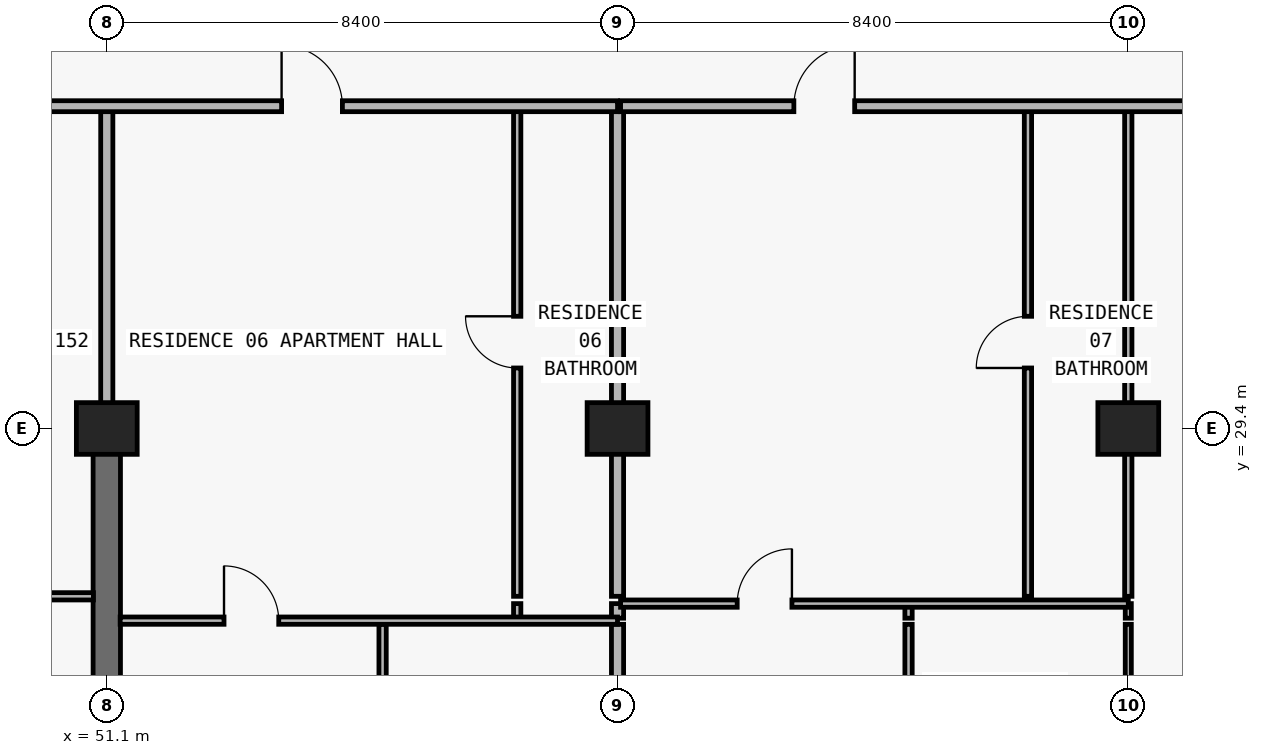
"""IFC4 building model, lengths in metres.
Left out: names, types, materials, properties, quantities, classifications, styles, units other than length and angle.
Written with IfcOpenShell. Run it as: python <this file> out.ifc"""

import sys

from ifc_helpers import new_model, si_unit, direction, frame, frame_2d, origin, origin_2d, place, context, subcontext, project, spatial, rectangle, extrude, element, fill, save


model = new_model("IFC4")
c1 = context("Model", 3, precision=1e-05, world=origin(), true_north=direction((0.0, 1.0)))
c2 = subcontext(c1, "Body", "Model", "MODEL_VIEW")
j1 = project(units=[si_unit("LENGTHUNIT", "METRE"), si_unit("PLANEANGLEUNIT", "RADIAN")], contexts=[c1])
p1 = place(None, origin())
s1 = spatial("IfcSite", under=j1, at=p1, CompositionType="ELEMENT")
p2 = place(p1, origin())
s2 = spatial("IfcBuilding", under=s1, at=p2, CompositionType="ELEMENT")
p3 = place(p2, frame((0.0, 0.0, 125.7)))
s3 = spatial("IfcBuildingStorey", under=s2, at=p3, CompositionType="ELEMENT", Elevation=125.7)
for number, where, z_axis, x_axis in (
    (1, (51.1, 29.4, 0.0), (0.0, 0.0, 1.0), (1.0, 0.0, 0.0)),
    (2, (59.5, 29.4, 0.0), (0.0, 0.0, 1.0), (1.0, 0.0, 0.0)),
    (3, (67.9, 29.4, 0.0), (0.0, 0.0, 1.0), (1.0, 0.0, 0.0)),
):
    element("IfcColumn", number, at=place(p3, frame(where, z_axis=z_axis, x_axis=x_axis)), inside=s3, PredefinedType="COLUMN", context=c2, shape_type="SweptSolid", body=[
        extrude(rectangle(XDim=1.0, YDim=0.85, at=origin_2d()), origin(), (0.0, 0.0, 1.0), 3.05),
    ])
p4 = place(p3, frame((51.1, 20.8, 0.0), z_axis=(0.0, 0.0, 1.0), x_axis=(0.0, 1.0, 0.0)))
e4 = element("IfcWall", 4, at=p4, inside=s3, PredefinedType="SHEAR", context=c2, shape_type="SweptSolid", body=[
    extrude(rectangle(XDim=8.6, YDim=0.45, at=frame_2d((4.3, 0.0))), origin(), (0.0, 0.0, 1.0), 3.05),
])
p5 = place(p3, frame((51.1, 29.405, 0.0), z_axis=(0.0, 0.0, 1.0), x_axis=(0.0, 1.0, 0.0)))
e5 = element("IfcWall", 5, at=p5, inside=s3, PredefinedType="PARTITIONING", context=c2, shape_type="SweptSolid", body=[
    extrude(rectangle(XDim=5.295, YDim=0.2, at=frame_2d((2.647, 0.0))), origin(), (0.0, 0.0, 1.0), 2.335),
])
p6 = place(p3, frame((55.636, 21.49, 0.0), z_axis=(0.0, 0.0, 1.0), x_axis=(0.0, 1.0, 0.0)))
e6 = element("IfcWall", 6, at=p6, inside=s3, PredefinedType="PARTITIONING", context=c2, shape_type="SweptSolid", body=[
    extrude(rectangle(XDim=4.69, YDim=0.12, at=frame_2d((2.345, 0.0))), origin(), (0.0, 0.0, 1.0), 3.05),
])
p7 = place(p6, frame((1.895, 0.0, 0.0)))
e7 = element("IfcOpeningElement", 7, at=p7, cuts=e6, PredefinedType="OPENING", context=c2, shape_type="SweptSolid", body=[
    extrude(rectangle(XDim=0.9, YDim=2.15, at=frame_2d((0.45, 1.075))), frame((0.0, 0.07, 0.0), z_axis=(0.0, -1.0, 0.0), x_axis=(1.0, 0.0, 0.0)), (0.0, 0.0, 1.0), 0.14),
])
p8 = place(p3, frame((57.85, 26.28, 0.0), z_axis=(0.0, 0.0, 1.0), x_axis=(0.0, 1.0, 0.0)))
e8 = element("IfcWall", 8, at=p8, inside=s3, PredefinedType="PARTITIONING", context=c2, shape_type="SweptSolid", body=[
    extrude(rectangle(XDim=0.24, YDim=0.12, at=frame_2d((0.12, 0.0))), origin(), (0.0, 0.0, 1.0), 3.05),
])
p9 = place(p3, frame((57.85, 26.64, 0.0), z_axis=(0.0, 0.0, 1.0), x_axis=(0.0, 1.0, 0.0)))
e9 = element("IfcWall", 9, at=p9, inside=s3, PredefinedType="PARTITIONING", context=c2, shape_type="SweptSolid", body=[
    extrude(rectangle(XDim=8.06, YDim=0.12, at=frame_2d((4.03, 0.0))), origin(), (0.0, 0.0, 1.0), 3.05),
])
p10 = place(p9, frame((3.755, 0.0, 0.0)))
e10 = element("IfcOpeningElement", 10, at=p10, cuts=e9, PredefinedType="OPENING", context=c2, shape_type="SweptSolid", body=[
    extrude(rectangle(XDim=0.85, YDim=2.1, at=frame_2d((0.425, 1.05))), frame((0.0, 0.07, 0.0), z_axis=(0.0, -1.0, 0.0), x_axis=(1.0, 0.0, 0.0)), (0.0, 0.0, 1.0), 0.14),
])
p11 = place(p3, frame((59.5, 21.49, 0.0), z_axis=(0.0, 0.0, 1.0), x_axis=(0.0, 1.0, 0.0)))
e11 = element("IfcWall", 11, at=p11, inside=s3, PredefinedType="PARTITIONING", context=c2, shape_type="SweptSolid", body=[
    extrude(rectangle(XDim=4.69, YDim=0.2, at=frame_2d((2.345, 0.0))), origin(), (0.0, 0.0, 1.0), 2.174),
])
p12 = place(p3, frame((59.5, 26.28, 0.0), z_axis=(0.0, 0.0, 1.0), x_axis=(0.0, 1.0, 0.0)))
e12 = element("IfcWall", 12, at=p12, inside=s3, PredefinedType="PARTITIONING", context=c2, shape_type="SweptSolid", body=[
    extrude(rectangle(XDim=0.24, YDim=0.2, at=frame_2d((0.12, 0.0))), origin(), (0.0, 0.0, 1.0), 2.174),
])
p13 = place(p3, frame((59.5, 26.64, 0.0), z_axis=(0.0, 0.0, 1.0), x_axis=(0.0, 1.0, 0.0)))
e13 = element("IfcWall", 13, at=p13, inside=s3, PredefinedType="PARTITIONING", context=c2, shape_type="SweptSolid", body=[
    extrude(rectangle(XDim=8.06, YDim=0.2, at=frame_2d((4.03, 0.0))), origin(), (0.0, 0.0, 1.0), 2.174),
])
p14 = place(p3, frame((64.286, 21.49, 0.0), z_axis=(0.0, 0.0, 1.0), x_axis=(0.0, 1.0, 0.0)))
e14 = element("IfcWall", 14, at=p14, inside=s3, PredefinedType="PARTITIONING", context=c2, shape_type="SweptSolid", body=[
    extrude(rectangle(XDim=4.69, YDim=0.12, at=frame_2d((2.345, 0.0))), origin(), (0.0, 0.0, 1.0), 3.05),
])
p15 = place(p14, frame((1.895, 0.0, 0.0)))
e15 = element("IfcOpeningElement", 15, at=p15, cuts=e14, PredefinedType="OPENING", context=c2, shape_type="SweptSolid", body=[
    extrude(rectangle(XDim=0.9, YDim=2.15, at=frame_2d((0.45, 1.075))), frame((0.0, 0.07, 0.0), z_axis=(0.0, -1.0, 0.0), x_axis=(1.0, 0.0, 0.0)), (0.0, 0.0, 1.0), 0.14),
])
p16 = place(p3, frame((64.286, 26.28, 0.0), z_axis=(0.0, 0.0, 1.0), x_axis=(0.0, 1.0, 0.0)))
e16 = element("IfcWall", 16, at=p16, inside=s3, PredefinedType="PARTITIONING", context=c2, shape_type="SweptSolid", body=[
    extrude(rectangle(XDim=0.24, YDim=0.12, at=frame_2d((0.12, 0.0))), origin(), (0.0, 0.0, 1.0), 3.05),
])
p17 = place(p3, frame((66.25, 26.64, 0.0), z_axis=(0.0, 0.0, 1.0), x_axis=(0.0, 1.0, 0.0)))
e17 = element("IfcWall", 17, at=p17, inside=s3, PredefinedType="PARTITIONING", context=c2, shape_type="SweptSolid", body=[
    extrude(rectangle(XDim=8.06, YDim=0.12, at=frame_2d((4.03, 0.0))), origin(), (0.0, 0.0, 1.0), 3.05),
])
p18 = place(p17, frame((3.755, 0.0, 0.0)))
e18 = element("IfcOpeningElement", 18, at=p18, cuts=e17, PredefinedType="OPENING", context=c2, shape_type="SweptSolid", body=[
    extrude(rectangle(XDim=0.85, YDim=2.1, at=frame_2d((0.425, 1.05))), frame((0.0, 0.07, 0.0), z_axis=(0.0, -1.0, 0.0), x_axis=(1.0, 0.0, 0.0)), (0.0, 0.0, 1.0), 0.14),
])
p19 = place(p3, frame((67.9, 21.49, 0.0), z_axis=(0.0, 0.0, 1.0), x_axis=(0.0, 1.0, 0.0)))
e19 = element("IfcWall", 19, at=p19, inside=s3, PredefinedType="MOVABLE", context=c2, shape_type="SweptSolid", body=[
    extrude(rectangle(XDim=4.69, YDim=0.1, at=frame_2d((2.345, 0.0))), origin(), (0.0, 0.0, 1.0), 2.174),
])
p20 = place(p19, frame((1.895, 0.0, 0.0)))
e20 = element("IfcOpeningElement", 20, at=p20, cuts=e19, PredefinedType="OPENING", context=c2, shape_type="SweptSolid", body=[
    extrude(rectangle(XDim=0.9, YDim=2.124, at=frame_2d((0.45, 1.062))), frame((0.0, 0.06, 0.0), z_axis=(0.0, -1.0, 0.0), x_axis=(1.0, 0.0, 0.0)), (0.0, 0.0, 1.0), 0.12),
])
p21 = place(p3, frame((67.9, 26.28, 0.0), z_axis=(0.0, 0.0, 1.0), x_axis=(0.0, 1.0, 0.0)))
e21 = element("IfcWall", 21, at=p21, inside=s3, PredefinedType="MOVABLE", context=c2, shape_type="SweptSolid", body=[
    extrude(rectangle(XDim=0.24, YDim=0.1, at=frame_2d((0.12, 0.0))), origin(), (0.0, 0.0, 1.0), 2.174),
])
p22 = place(p3, frame((67.9, 26.64, 0.0), z_axis=(0.0, 0.0, 1.0), x_axis=(0.0, 1.0, 0.0)))
e22 = element("IfcWall", 22, at=p22, inside=s3, PredefinedType="PARTITIONING", context=c2, shape_type="SweptSolid", body=[
    extrude(rectangle(XDim=8.06, YDim=0.12, at=frame_2d((4.03, 0.0))), origin(), (0.0, 0.0, 1.0), 2.174),
])
p23 = place(p3, frame((51.32, 26.24, 0.0), z_axis=(0.0, 0.0, 1.0), x_axis=(1.0, 0.0, 0.0)))
e23 = element("IfcWall", 23, at=p23, inside=s3, PredefinedType="PARTITIONING", context=c2, shape_type="SweptSolid", body=[
    extrude(rectangle(XDim=8.18, YDim=0.12, at=frame_2d((4.09, 0.0))), origin(), (0.0, 0.0, 1.0), 3.05),
])
p24 = place(p23, frame((1.708, 0.0, 0.0)))
e24 = element("IfcOpeningElement", 24, at=p24, cuts=e23, PredefinedType="OPENING", context=c2, shape_type="SweptSolid", body=[
    extrude(rectangle(XDim=0.9, YDim=2.15, at=frame_2d((0.45, 1.075))), frame((0.0, 0.07, 0.0), z_axis=(0.0, -1.0, 0.0), x_axis=(1.0, 0.0, 0.0)), (0.0, 0.0, 1.0), 0.14),
])
p25 = place(p3, frame((59.55, 26.52, 0.0), z_axis=(0.0, 0.0, 1.0), x_axis=(1.0, 0.0, 0.0)))
e25 = element("IfcWall", 25, at=p25, inside=s3, PredefinedType="PARTITIONING", context=c2, shape_type="SweptSolid", body=[
    extrude(rectangle(XDim=8.35, YDim=0.12, at=frame_2d((4.175, 0.0))), origin(), (0.0, 0.0, 1.0), 3.05),
])
p26 = place(p25, frame((1.918, 0.0, 0.0)))
e26 = element("IfcOpeningElement", 26, at=p26, cuts=e25, PredefinedType="OPENING", context=c2, shape_type="SweptSolid", body=[
    extrude(rectangle(XDim=0.9, YDim=2.15, at=frame_2d((0.45, 1.075))), frame((0.0, 0.07, 0.0), z_axis=(0.0, -1.0, 0.0), x_axis=(1.0, 0.0, 0.0)), (0.0, 0.0, 1.0), 0.14),
])
p27 = place(p3, frame((42.7, 26.64, 0.0), z_axis=(0.0, 0.0, 1.0), x_axis=(1.0, 0.0, 0.0)))
e27 = element("IfcWall", 27, at=p27, inside=s3, PredefinedType="PARTITIONING", context=c2, shape_type="SweptSolid", body=[
    extrude(rectangle(XDim=8.18, YDim=0.12, at=frame_2d((4.09, 0.0))), origin(), (0.0, 0.0, 1.0), 3.05),
])
p28 = place(p27, frame((1.693, 0.0, 0.0)))
e28 = element("IfcOpeningElement", 28, at=p28, cuts=e27, PredefinedType="OPENING", context=c2, shape_type="SweptSolid", body=[
    extrude(rectangle(XDim=0.9, YDim=2.15, at=frame_2d((0.45, 1.075))), frame((0.0, 0.07, 0.0), z_axis=(0.0, -1.0, 0.0), x_axis=(1.0, 0.0, 0.0)), (0.0, 0.0, 1.0), 0.14),
])
p29 = place(p3, frame((26.7, 34.7, 0.0), z_axis=(0.0, 0.0, 1.0), x_axis=(1.0, 0.0, 0.0)))
e29 = element("IfcWall", 29, at=p29, inside=s3, PredefinedType="PARTITIONING", context=c2, shape_type="SweptSolid", body=[
    extrude(rectangle(XDim=32.8, YDim=0.18, at=frame_2d((16.4, 0.0))), origin(), (0.0, 0.0, 1.0), 3.05),
])
p30 = place(p29, frame((2.875, 0.0, 0.0)))
e30 = element("IfcOpeningElement", 30, at=p30, cuts=e29, PredefinedType="OPENING", context=c2, shape_type="SweptSolid", body=[
    extrude(rectangle(XDim=1.0, YDim=2.2, at=frame_2d((0.5, 1.1))), frame((0.0, 0.1, 0.0), z_axis=(0.0, -1.0, 0.0), x_axis=(1.0, 0.0, 0.0)), (0.0, 0.0, 1.0), 0.2),
])
p31 = place(p29, frame((10.875, 0.0, 0.0)))
e31 = element("IfcOpeningElement", 31, at=p31, cuts=e29, PredefinedType="OPENING", context=c2, shape_type="SweptSolid", body=[
    extrude(rectangle(XDim=1.0, YDim=2.2, at=frame_2d((0.5, 1.1))), frame((0.0, 0.1, 0.0), z_axis=(0.0, -1.0, 0.0), x_axis=(1.0, 0.0, 0.0)), (0.0, 0.0, 1.0), 0.2),
])
p32 = place(p29, frame((18.875, 0.0, 0.0)))
e32 = element("IfcOpeningElement", 32, at=p32, cuts=e29, PredefinedType="OPENING", context=c2, shape_type="SweptSolid", body=[
    extrude(rectangle(XDim=1.0, YDim=2.2, at=frame_2d((0.5, 1.1))), frame((0.0, 0.1, 0.0), z_axis=(0.0, -1.0, 0.0), x_axis=(1.0, 0.0, 0.0)), (0.0, 0.0, 1.0), 0.2),
])
p33 = place(p29, frame((27.275, 0.0, 0.0)))
e33 = element("IfcOpeningElement", 33, at=p33, cuts=e29, PredefinedType="OPENING", context=c2, shape_type="SweptSolid", body=[
    extrude(rectangle(XDim=1.0, YDim=2.2, at=frame_2d((0.5, 1.1))), frame((0.0, 0.1, 0.0), z_axis=(0.0, -1.0, 0.0), x_axis=(1.0, 0.0, 0.0)), (0.0, 0.0, 1.0), 0.2),
])
p34 = place(p3, frame((59.55, 34.7, 0.0), z_axis=(0.0, 0.0, 1.0), x_axis=(1.0, 0.0, 0.0)))
e34 = element("IfcWall", 34, at=p34, inside=s3, PredefinedType="PARTITIONING", context=c2, shape_type="SweptSolid", body=[
    extrude(rectangle(XDim=10.55, YDim=0.18, at=frame_2d((5.275, 0.0))), origin(), (0.0, 0.0, 1.0), 3.05),
])
p35 = place(p34, frame((2.85, 0.0, 0.0)))
e35 = element("IfcOpeningElement", 35, at=p35, cuts=e34, PredefinedType="OPENING", context=c2, shape_type="SweptSolid", body=[
    extrude(rectangle(XDim=1.0, YDim=2.2, at=frame_2d((0.5, 1.1))), frame((0.0, 0.1, 0.0), z_axis=(0.0, -1.0, 0.0), x_axis=(1.0, 0.0, 0.0)), (0.0, 0.0, 1.0), 0.2),
])
p36 = place(p33, origin())
e36 = element("IfcDoor", 36, at=p36, inside=s3, OperationType="SINGLE_SWING_LEFT", PredefinedType="DOOR", context=c2, shape_type="SweptSolid", body=[
    extrude(rectangle(XDim=1.0, YDim=2.2, at=frame_2d((0.5, 1.1))), frame((0.0, 0.025, 0.0), z_axis=(0.0, -1.0, 0.0), x_axis=(1.0, 0.0, 0.0)), (0.0, 0.0, 1.0), 0.05),
])
fill(e33, e36)
p37 = place(p10, origin())
e37 = element("IfcDoor", 37, at=p37, inside=s3, OperationType="SINGLE_SWING_RIGHT", PredefinedType="DOOR", context=c2, shape_type="SweptSolid", body=[
    extrude(rectangle(XDim=0.85, YDim=2.1, at=frame_2d((0.425, 1.05))), frame((0.0, 0.025, 0.0), z_axis=(0.0, -1.0, 0.0), x_axis=(1.0, 0.0, 0.0)), (0.0, 0.0, 1.0), 0.05),
])
fill(e10, e37)
p38 = place(p24, origin())
e38 = element("IfcDoor", 38, at=p38, inside=s3, OperationType="SINGLE_SWING_LEFT", PredefinedType="DOOR", context=c2, shape_type="SweptSolid", body=[
    extrude(rectangle(XDim=0.9, YDim=2.15, at=frame_2d((0.45, 1.075))), frame((0.0, 0.025, 0.0), z_axis=(0.0, -1.0, 0.0), x_axis=(1.0, 0.0, 0.0)), (0.0, 0.0, 1.0), 0.05),
])
fill(e24, e38)
p39 = place(p35, origin())
e39 = element("IfcDoor", 39, at=p39, inside=s3, OperationType="SINGLE_SWING_RIGHT", PredefinedType="DOOR", context=c2, shape_type="SweptSolid", body=[
    extrude(rectangle(XDim=1.0, YDim=2.2, at=frame_2d((0.5, 1.1))), frame((0.0, 0.025, 0.0), z_axis=(0.0, -1.0, 0.0), x_axis=(1.0, 0.0, 0.0)), (0.0, 0.0, 1.0), 0.05),
])
fill(e35, e39)
p40 = place(p18, origin())
e40 = element("IfcDoor", 40, at=p40, inside=s3, OperationType="SINGLE_SWING_LEFT", PredefinedType="DOOR", context=c2, shape_type="SweptSolid", body=[
    extrude(rectangle(XDim=0.85, YDim=2.1, at=frame_2d((0.425, 1.05))), frame((0.0, 0.025, 0.0), z_axis=(0.0, -1.0, 0.0), x_axis=(1.0, 0.0, 0.0)), (0.0, 0.0, 1.0), 0.05),
])
fill(e18, e40)
p41 = place(p26, origin())
e41 = element("IfcDoor", 41, at=p41, inside=s3, OperationType="SINGLE_SWING_RIGHT", PredefinedType="DOOR", context=c2, shape_type="SweptSolid", body=[
    extrude(rectangle(XDim=0.9, YDim=2.15, at=frame_2d((0.45, 1.075))), frame((0.0, 0.025, 0.0), z_axis=(0.0, -1.0, 0.0), x_axis=(1.0, 0.0, 0.0)), (0.0, 0.0, 1.0), 0.05),
])
fill(e26, e41)
save(model, sys.argv[1])
